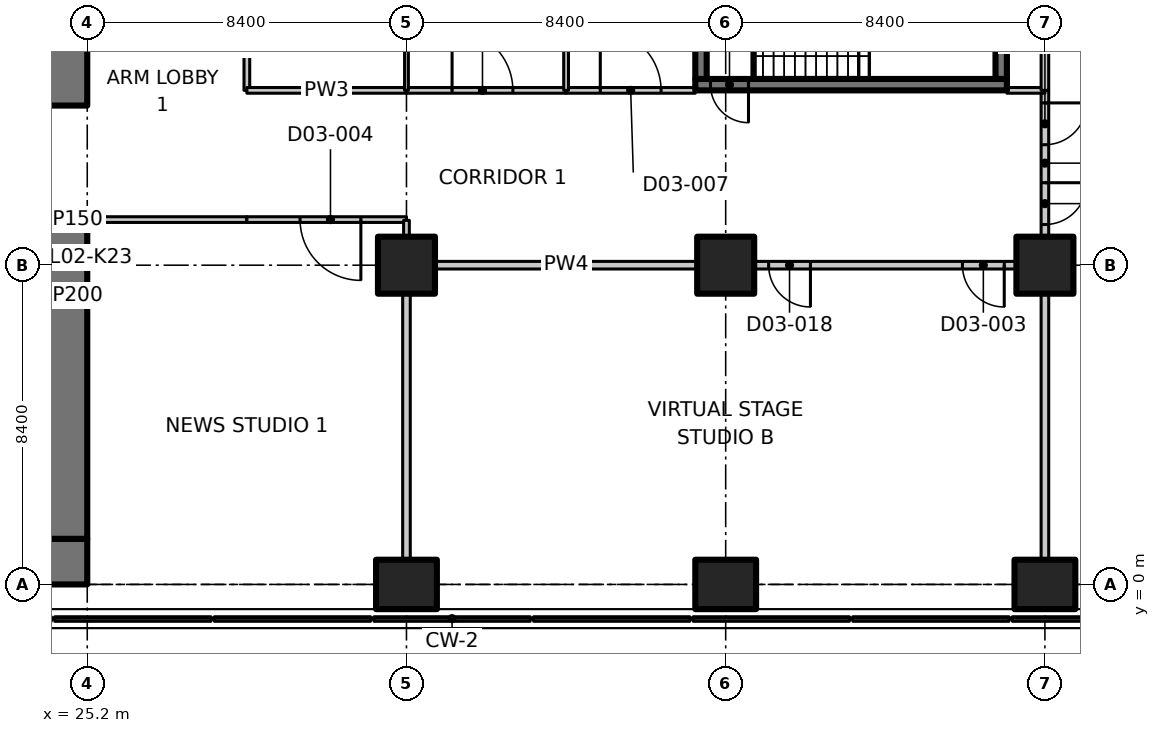
"""IFC4 building model, lengths in metres.
Left out: names, types, materials, properties, quantities, classifications, styles, units other than length and angle.
Written with IfcOpenShell. Run it as: python <this file> out.ifc"""

import sys

from ifc_helpers import new_model, si_unit, direction, frame, frame_2d, origin, origin_2d, place, context, subcontext, project, spatial, polyline, rectangle, outline, extrude, element, fill, save


model = new_model("IFC4")
c1 = context("Model", 3, precision=1e-05, world=origin(), true_north=direction((0.0, 1.0)))
c2 = subcontext(c1, "Body", "Model", "MODEL_VIEW")
j1 = project(units=[si_unit("LENGTHUNIT", "METRE"), si_unit("PLANEANGLEUNIT", "RADIAN")], contexts=[c1])
p1 = place(None, origin())
s1 = spatial("IfcSite", under=j1, at=p1, CompositionType="ELEMENT")
p2 = place(p1, origin())
s2 = spatial("IfcBuilding", under=s1, at=p2, CompositionType="ELEMENT")
p3 = place(p2, frame((0.0, 0.0, 12.5)))
s3 = spatial("IfcBuildingStorey", under=s2, at=p3, CompositionType="ELEMENT", Elevation=12.5)
p4 = place(p3, frame((33.6, 0.0, 0.0), z_axis=(0.0, 0.0, 1.0), x_axis=(0.0, 1.0, 0.0)))
e1 = element("IfcColumn", 1, at=p4, inside=s3, PredefinedType="COLUMN", context=c2, shape_type="SweptSolid", body=[
    extrude(rectangle(XDim=1.3, YDim=1.6, at=origin_2d()), origin(), (0.0, 0.0, 1.0), 7.25),
])
p5 = place(p3, frame((33.6, 8.4, 0.0), z_axis=(0.0, 0.0, 1.0), x_axis=(1.0, 0.0, 0.0)))
e2 = element("IfcColumn", 2, at=p5, inside=s3, PredefinedType="COLUMN", context=c2, shape_type="SweptSolid", body=[
    extrude(rectangle(XDim=1.5, YDim=1.5, at=origin_2d()), origin(), (0.0, 0.0, 1.0), 7.25),
])
p6 = place(p3, frame((42.0, 0.0, 0.0), z_axis=(0.0, 0.0, 1.0), x_axis=(0.0, 1.0, 0.0)))
e3 = element("IfcColumn", 3, at=p6, inside=s3, PredefinedType="COLUMN", context=c2, shape_type="SweptSolid", body=[
    extrude(rectangle(XDim=1.3, YDim=1.6, at=origin_2d()), origin(), (0.0, 0.0, 1.0), 7.25),
])
p7 = place(p3, frame((42.0, 8.4, 0.0), z_axis=(0.0, 0.0, 1.0), x_axis=(1.0, 0.0, 0.0)))
e4 = element("IfcColumn", 4, at=p7, inside=s3, PredefinedType="COLUMN", context=c2, shape_type="SweptSolid", body=[
    extrude(rectangle(XDim=1.5, YDim=1.5, at=origin_2d()), origin(), (0.0, 0.0, 1.0), 7.25),
])
p8 = place(p3, frame((50.4, 0.0, 0.0), z_axis=(0.0, 0.0, 1.0), x_axis=(0.0, 1.0, 0.0)))
e5 = element("IfcColumn", 5, at=p8, inside=s3, PredefinedType="COLUMN", context=c2, shape_type="SweptSolid", body=[
    extrude(rectangle(XDim=1.3, YDim=1.6, at=origin_2d()), origin(), (0.0, 0.0, 1.0), 7.25),
])
p9 = place(p3, frame((50.4, 8.4, 0.0), z_axis=(0.0, 0.0, 1.0), x_axis=(1.0, 0.0, 0.0)))
e6 = element("IfcColumn", 6, at=p9, inside=s3, PredefinedType="COLUMN", context=c2, shape_type="SweptSolid", body=[
    extrude(rectangle(XDim=1.5, YDim=1.5, at=origin_2d()), origin(), (0.0, 0.0, 1.0), 7.25),
])
p10 = place(p3, origin())
e7 = element("IfcWall", 7, at=p10, inside=s3, PredefinedType="SOLIDWALL", context=c2, shape_type="SweptSolid", body=[
    extrude(outline(polyline([(28.455, -0.97), (28.455, -0.85), (24.345, -0.85), (24.345, -0.97), (28.455, -0.97)])), origin(), (0.0, 0.0, 1.0), 7.5),
])
p11 = place(p3, origin())
e8 = element("IfcWall", 8, at=p11, inside=s3, PredefinedType="SOLIDWALL", context=c2, shape_type="SweptSolid", body=[
    extrude(outline(polyline([(32.655, -0.97), (32.655, -0.85), (28.545, -0.85), (28.545, -0.97), (32.655, -0.97)])), origin(), (0.0, 0.0, 1.0), 7.5),
])
p12 = place(p3, origin())
e9 = element("IfcWall", 9, at=p12, inside=s3, PredefinedType="SOLIDWALL", context=c2, shape_type="SweptSolid", body=[
    extrude(outline(polyline([(36.855, -0.97), (36.855, -0.85), (32.745, -0.85), (32.745, -0.97), (36.855, -0.97)])), origin(), (0.0, 0.0, 1.0), 7.5),
])
p13 = place(p3, origin())
e10 = element("IfcWall", 10, at=p13, inside=s3, PredefinedType="SOLIDWALL", context=c2, shape_type="SweptSolid", body=[
    extrude(outline(polyline([(41.055, -0.97), (41.055, -0.85), (36.945, -0.85), (36.945, -0.97), (41.055, -0.97)])), origin(), (0.0, 0.0, 1.0), 7.5),
])
p14 = place(p3, origin())
e11 = element("IfcWall", 11, at=p14, inside=s3, PredefinedType="SOLIDWALL", context=c2, shape_type="SweptSolid", body=[
    extrude(outline(polyline([(45.255, -0.97), (45.255, -0.85), (41.145, -0.85), (41.145, -0.97), (45.255, -0.97)])), origin(), (0.0, 0.0, 1.0), 7.5),
])
p15 = place(p3, origin())
e12 = element("IfcWall", 12, at=p15, inside=s3, PredefinedType="SOLIDWALL", context=c2, shape_type="SweptSolid", body=[
    extrude(outline(polyline([(49.455, -0.97), (49.455, -0.85), (45.345, -0.85), (45.345, -0.97), (49.455, -0.97)])), origin(), (0.0, 0.0, 1.0), 7.5),
])
p16 = place(p3, origin())
e13 = element("IfcWall", 13, at=p16, inside=s3, PredefinedType="SOLIDWALL", context=c2, shape_type="SweptSolid", body=[
    extrude(outline(polyline([(53.655, -0.97), (53.655, -0.85), (49.545, -0.85), (49.545, -0.97), (53.655, -0.97)])), origin(), (0.0, 0.0, 1.0), 7.5),
])
p17 = place(p3, frame((6.736, 0.6, 0.0), z_axis=(0.0, 0.0, 1.0), x_axis=(1.0, 0.0, 0.0)))
e14 = element("IfcWall", 14, at=p17, inside=s3, PredefinedType="SHEAR", context=c2, shape_type="SweptSolid", body=[
    extrude(rectangle(XDim=18.464, YDim=1.2, at=frame_2d((9.232, 0.0))), origin(), (0.0, 0.0, 1.0), 7.25),
])
p18 = place(p3, frame((24.6, 1.2, 0.0), z_axis=(0.0, 0.0, 1.0), x_axis=(0.0, 1.0, 0.0)))
e15 = element("IfcWall", 15, at=p18, inside=s3, PredefinedType="SHEAR", context=c2, shape_type="SweptSolid", body=[
    extrude(rectangle(XDim=8.6, YDim=1.2, at=frame_2d((4.3, 0.0))), origin(), (0.0, 0.0, 1.0), 7.25),
])
p19 = place(p3, frame((24.6, 12.6, 0.0), z_axis=(0.0, 0.0, 1.0), x_axis=(0.0, 1.0, 0.0)))
e16 = element("IfcWall", 16, at=p19, inside=s3, PredefinedType="SHEAR", context=c2, shape_type="SweptSolid", body=[
    extrude(rectangle(XDim=3.0, YDim=1.2, at=frame_2d((1.5, 0.0))), origin(), (0.0, 0.0, 1.0), 7.25),
])
p20 = place(p3, frame((49.4, 13.15, 0.0), z_axis=(0.0, 0.0, 1.0), x_axis=(-1.0, 0.0, 0.0)))
e17 = element("IfcWall", 17, at=p20, inside=s3, PredefinedType="SHEAR", context=c2, shape_type="SweptSolid", body=[
    extrude(rectangle(XDim=8.2, YDim=0.3, at=frame_2d((4.1, 0.0))), origin(), (0.0, 0.0, 1.0), 7.25),
])
p21 = place(p20, frame((6.8, 0.0, 0.0)))
e18 = element("IfcOpeningElement", 18, at=p21, cuts=e17, PredefinedType="OPENING", context=c2, shape_type="SweptSolid", body=[
    extrude(rectangle(XDim=1.0, YDim=2.1, at=frame_2d((0.5, 1.05))), frame((0.0, 0.16, 0.0), z_axis=(0.0, -1.0, 0.0), x_axis=(1.0, 0.0, 0.0)), (0.0, 0.0, 1.0), 0.32),
])
for number, where, z_axis, x_axis in (
    (19, (41.35, 13.3, 0.0), (0.0, 0.0, 1.0), (0.0, 1.0, 0.0)),
    (20, (49.25, 13.3, 0.0), (0.0, 0.0, 1.0), (0.0, 1.0, 0.0)),
):
    element("IfcWall", number, at=place(p3, frame(where, z_axis=z_axis, x_axis=x_axis)), inside=s3, PredefinedType="SHEAR", context=c2, shape_type="SweptSolid", body=[
        extrude(rectangle(XDim=2.55, YDim=0.3, at=frame_2d((1.275, 0.0))), origin(), (0.0, 0.0, 1.0), 7.25),
    ])
p22 = place(p3, frame((29.4, 9.6, 0.0), z_axis=(0.0, 0.0, 1.0), x_axis=(-1.0, 0.0, 0.0)))
e21 = element("IfcWall", 21, at=p22, inside=s3, PredefinedType="PARTITIONING", context=c2, shape_type="SweptSolid", body=[
    extrude(rectangle(XDim=4.2, YDim=0.15, at=frame_2d((2.1, 0.0))), origin(), (0.0, 0.0, 1.0), 7.23),
])
p23 = place(p3, frame((29.4, 21.2, 0.0), z_axis=(0.0, 0.0, 1.0), x_axis=(0.0, -1.0, 0.0)))
e22 = element("IfcWall", 22, at=p23, inside=s3, PredefinedType="PARTITIONING", context=c2, shape_type="SweptSolid", body=[
    extrude(rectangle(XDim=8.2, YDim=0.15, at=frame_2d((4.1, 0.0))), origin(), (0.0, 0.0, 1.0), 7.23),
])
p24 = place(p23, frame((3.3, 0.0, 0.0)))
e23 = element("IfcOpeningElement", 23, at=p24, cuts=e22, PredefinedType="OPENING", context=c2, shape_type="SweptSolid", body=[
    extrude(rectangle(XDim=1.6, YDim=2.1, at=frame_2d((0.8, 1.05))), frame((0.0, 0.085, 0.0), z_axis=(0.0, -1.0, 0.0), x_axis=(1.0, 0.0, 0.0)), (0.0, 0.0, 1.0), 0.17),
])
p25 = place(p3, frame((50.4, 13.0, 0.0), z_axis=(0.0, 0.0, 1.0), x_axis=(0.0, -1.0, 0.0)))
e24 = element("IfcWall", 24, at=p25, inside=s3, PredefinedType="PARTITIONING", context=c2, shape_type="SweptSolid", body=[
    extrude(rectangle(XDim=3.83, YDim=0.2, at=frame_2d((1.915, 0.0))), origin(), (0.0, 0.0, 1.0), 7.23),
])
p26 = place(p25, frame((2.43, 0.0, 0.0)))
e25 = element("IfcOpeningElement", 25, at=p26, cuts=e24, PredefinedType="OPENING", context=c2, shape_type="SweptSolid", body=[
    extrude(rectangle(XDim=1.1, YDim=2.1, at=frame_2d((0.55, 1.05))), frame((0.0, 0.11, 0.0), z_axis=(0.0, -1.0, 0.0), x_axis=(1.0, 0.0, 0.0)), (0.0, 0.0, 1.0), 0.22),
])
p27 = place(p25, frame((0.33, 0.0, 0.0)))
e26 = element("IfcOpeningElement", 26, at=p27, cuts=e24, PredefinedType="OPENING", context=c2, shape_type="SweptSolid", body=[
    extrude(rectangle(XDim=1.1, YDim=2.1, at=frame_2d((0.55, 1.05))), frame((0.0, 0.11, 0.0), z_axis=(0.0, -1.0, 0.0), x_axis=(1.0, 0.0, 0.0)), (0.0, 0.0, 1.0), 0.22),
])
p28 = place(p3, frame((49.63, 8.4, 0.0), z_axis=(0.0, 0.0, 1.0), x_axis=(-1.0, 0.0, 0.0)))
e27 = element("IfcWall", 27, at=p28, inside=s3, PredefinedType="PARTITIONING", context=c2, shape_type="SweptSolid", body=[
    extrude(rectangle(XDim=6.86, YDim=0.2, at=frame_2d((3.43, 0.0))), origin(), (0.0, 0.0, 1.0), 7.23),
])
p29 = place(p28, frame((0.3, 0.0, 0.0)))
e28 = element("IfcOpeningElement", 28, at=p29, cuts=e27, PredefinedType="OPENING", context=c2, shape_type="SweptSolid", body=[
    extrude(rectangle(XDim=1.1, YDim=2.1, at=frame_2d((0.55, 1.05))), frame((0.0, 0.11, 0.0), z_axis=(0.0, -1.0, 0.0), x_axis=(1.0, 0.0, 0.0)), (0.0, 0.0, 1.0), 0.22),
])
p30 = place(p28, frame((5.4, 0.0, 0.0)))
e29 = element("IfcOpeningElement", 29, at=p30, cuts=e27, PredefinedType="OPENING", context=c2, shape_type="SweptSolid", body=[
    extrude(rectangle(XDim=1.1, YDim=2.1, at=frame_2d((0.55, 1.05))), frame((0.0, 0.11, 0.0), z_axis=(0.0, -1.0, 0.0), x_axis=(1.0, 0.0, 0.0)), (0.0, 0.0, 1.0), 0.22),
])
p31 = place(p3, frame((41.23, 8.4, 0.0), z_axis=(0.0, 0.0, 1.0), x_axis=(-1.0, 0.0, 0.0)))
e30 = element("IfcWall", 30, at=p31, inside=s3, PredefinedType="PARTITIONING", context=c2, shape_type="SweptSolid", body=[
    extrude(rectangle(XDim=6.86, YDim=0.2, at=frame_2d((3.43, 0.0))), origin(), (0.0, 0.0, 1.0), 7.23),
])
p32 = place(p3, frame((33.6, 9.6, 0.0), z_axis=(0.0, 0.0, 1.0), x_axis=(-1.0, 0.0, 0.0)))
e31 = element("IfcWall", 31, at=p32, inside=s3, PredefinedType="PARTITIONING", context=c2, shape_type="SweptSolid", body=[
    extrude(rectangle(XDim=4.2, YDim=0.15, at=frame_2d((2.1, 0.0))), origin(), (0.0, 0.0, 1.0), 7.23),
])
p33 = place(p32, frame((1.2, 0.0, 0.0)))
e32 = element("IfcOpeningElement", 32, at=p33, cuts=e31, PredefinedType="OPENING", context=c2, shape_type="SweptSolid", body=[
    extrude(rectangle(XDim=1.6, YDim=2.1, at=frame_2d((0.8, 1.05))), frame((0.0, 0.085, 0.0), z_axis=(0.0, -1.0, 0.0), x_axis=(1.0, 0.0, 0.0)), (0.0, 0.0, 1.0), 0.17),
])
p34 = place(p3, frame((33.6, 9.17, 0.0), z_axis=(0.0, 0.0, 1.0), x_axis=(0.0, 1.0, 0.0)))
e33 = element("IfcWall", 33, at=p34, inside=s3, PredefinedType="PARTITIONING", context=c2, shape_type="SweptSolid", body=[
    extrude(rectangle(XDim=0.41, YDim=0.15, at=frame_2d((0.205, 0.0))), origin(), (0.0, 0.0, 1.0), 7.23),
])
p35 = place(p3, frame((29.4, 13.0, 0.0), z_axis=(0.0, 0.0, 1.0), x_axis=(1.0, 0.0, 0.0)))
e34 = element("IfcWall", 34, at=p35, inside=s3, PredefinedType="PARTITIONING", context=c2, shape_type="SweptSolid", body=[
    extrude(rectangle(XDim=4.2, YDim=0.15, at=frame_2d((2.1, 0.0))), origin(), (0.0, 0.0, 1.0), 7.23),
])
p36 = place(p3, frame((33.6, 13.0, 0.0), z_axis=(0.0, 0.0, 1.0), x_axis=(1.0, 0.0, 0.0)))
e35 = element("IfcWall", 35, at=p36, inside=s3, PredefinedType="PARTITIONING", context=c2, shape_type="SweptSolid", body=[
    extrude(rectangle(XDim=4.2, YDim=0.15, at=frame_2d((2.1, 0.0))), origin(), (0.0, 0.0, 1.0), 7.23),
])
p37 = place(p36, frame((1.2, 0.0, 0.0)))
e36 = element("IfcOpeningElement", 36, at=p37, cuts=e35, PredefinedType="OPENING", context=c2, shape_type="SweptSolid", body=[
    extrude(rectangle(XDim=1.6, YDim=2.1, at=frame_2d((0.8, 1.05))), frame((0.0, 0.085, 0.0), z_axis=(0.0, -1.0, 0.0), x_axis=(1.0, 0.0, 0.0)), (0.0, 0.0, 1.0), 0.17),
])
p38 = place(p3, frame((37.8, 13.0, 0.0), z_axis=(0.0, 0.0, 1.0), x_axis=(1.0, 0.0, 0.0)))
e37 = element("IfcWall", 37, at=p38, inside=s3, PredefinedType="PARTITIONING", context=c2, shape_type="SweptSolid", body=[
    extrude(rectangle(XDim=3.4, YDim=0.15, at=frame_2d((1.7, 0.0))), origin(), (0.0, 0.0, 1.0), 7.23),
])
p39 = place(p38, frame((0.9, 0.0, 0.0)))
e38 = element("IfcOpeningElement", 38, at=p39, cuts=e37, PredefinedType="OPENING", context=c2, shape_type="SweptSolid", body=[
    extrude(rectangle(XDim=1.6, YDim=2.1, at=frame_2d((0.8, 1.05))), frame((0.0, 0.085, 0.0), z_axis=(0.0, -1.0, 0.0), x_axis=(1.0, 0.0, 0.0)), (0.0, 0.0, 1.0), 0.17),
])
p40 = place(p3, frame((49.4, 13.0, 0.0), z_axis=(0.0, 0.0, 1.0), x_axis=(1.0, 0.0, 0.0)))
e39 = element("IfcWall", 39, at=p40, inside=s3, PredefinedType="PARTITIONING", context=c2, shape_type="SweptSolid", body=[
    extrude(rectangle(XDim=1.0, YDim=0.15, at=frame_2d((0.5, 0.0))), origin(), (0.0, 0.0, 1.0), 7.23),
])
p41 = place(p3, frame((50.4, 0.67, 0.0), z_axis=(0.0, 0.0, 1.0), x_axis=(0.0, 1.0, 0.0)))
e40 = element("IfcWall", 40, at=p41, inside=s3, PredefinedType="PARTITIONING", context=c2, shape_type="SweptSolid", body=[
    extrude(rectangle(XDim=6.96, YDim=0.2, at=frame_2d((3.48, 0.0))), origin(), (0.0, 0.0, 1.0), 7.23),
])
p42 = place(p3, frame((50.4, 13.0, 0.0), z_axis=(0.0, 0.0, 1.0), x_axis=(0.0, 1.0, 0.0)))
e41 = element("IfcWall", 41, at=p42, inside=s3, PredefinedType="PARTITIONING", context=c2, shape_type="SweptSolid", body=[
    extrude(rectangle(XDim=3.03, YDim=0.2, at=frame_2d((1.515, 0.0))), origin(), (0.0, 0.0, 1.0), 7.23),
])
p43 = place(p3, frame((33.6, 0.67, 0.0), z_axis=(0.0, 0.0, 1.0), x_axis=(0.0, 1.0, 0.0)))
e42 = element("IfcWall", 42, at=p43, inside=s3, PredefinedType="PARTITIONING", context=c2, shape_type="SweptSolid", body=[
    extrude(rectangle(XDim=6.96, YDim=0.2, at=frame_2d((3.48, 0.0))), origin(), (0.0, 0.0, 1.0), 7.23),
])
p44 = place(p3, frame((33.6, 16.03, 0.0), z_axis=(0.0, 0.0, 1.0), x_axis=(0.0, -1.0, 0.0)))
e43 = element("IfcWall", 43, at=p44, inside=s3, PredefinedType="PARTITIONING", context=c2, shape_type="SweptSolid", body=[
    extrude(rectangle(XDim=3.03, YDim=0.1, at=frame_2d((1.515, 0.0))), origin(), (0.0, 0.0, 1.0), 7.23),
])
p45 = place(p3, frame((37.8, 29.844, 0.0), z_axis=(0.0, 0.0, 1.0), x_axis=(0.0, -1.0, 0.0)))
e44 = element("IfcWall", 44, at=p45, inside=s3, PredefinedType="PARTITIONING", context=c2, shape_type="SweptSolid", body=[
    extrude(outline(polyline([(0.0, 0.0), (16.844, 0.0), (16.844, 7.23), (5.094, 7.23), (5.092, 6.88), (4.196, 6.88), (4.194, 7.23), (0.0, 7.23), (0.0, 0.0)])), frame((0.0, 0.062, 0.0), z_axis=(0.0, -1.0, 0.0), x_axis=(1.0, 0.0, 0.0)), (0.0, 0.0, 1.0), 0.125),
])
p46 = place(p21, origin())
e45 = element("IfcDoor", 45, at=p46, inside=s3, OperationType="SINGLE_SWING_RIGHT", PredefinedType="DOOR", context=c2, shape_type="SweptSolid", body=[
    extrude(rectangle(XDim=1.0, YDim=2.1, at=frame_2d((0.5, 1.05))), frame((0.0, 0.025, 0.0), z_axis=(0.0, -1.0, 0.0), x_axis=(1.0, 0.0, 0.0)), (0.0, 0.0, 1.0), 0.05),
])
fill(e18, e45)
p47 = place(p26, origin())
e46 = element("IfcDoor", 46, at=p47, inside=s3, OperationType="SINGLE_SWING_RIGHT", PredefinedType="DOOR", context=c2, shape_type="SweptSolid", body=[
    extrude(rectangle(XDim=1.1, YDim=2.1, at=frame_2d((0.55, 1.05))), frame((0.0, 0.025, 0.0), z_axis=(0.0, -1.0, 0.0), x_axis=(1.0, 0.0, 0.0)), (0.0, 0.0, 1.0), 0.05),
])
fill(e25, e46)
p48 = place(p29, origin())
e47 = element("IfcDoor", 47, at=p48, inside=s3, OperationType="SINGLE_SWING_LEFT", PredefinedType="DOOR", context=c2, shape_type="SweptSolid", body=[
    extrude(rectangle(XDim=1.1, YDim=2.1, at=frame_2d((0.55, 1.05))), frame((0.0, 0.025, 0.0), z_axis=(0.0, -1.0, 0.0), x_axis=(1.0, 0.0, 0.0)), (0.0, 0.0, 1.0), 0.05),
])
fill(e28, e47)
p49 = place(p33, origin())
e48 = element("IfcDoor", 48, at=p49, inside=s3, OperationType="DOUBLE_DOOR_SINGLE_SWING", PredefinedType="DOOR", context=c2, shape_type="SweptSolid", body=[
    extrude(rectangle(XDim=1.6, YDim=2.1, at=frame_2d((0.8, 1.05))), frame((0.0, 0.025, 0.0), z_axis=(0.0, -1.0, 0.0), x_axis=(1.0, 0.0, 0.0)), (0.0, 0.0, 1.0), 0.05),
])
fill(e32, e48)
p50 = place(p37, origin())
e49 = element("IfcDoor", 49, at=p50, inside=s3, OperationType="DOUBLE_DOOR_SINGLE_SWING", PredefinedType="DOOR", context=c2, shape_type="SweptSolid", body=[
    extrude(rectangle(XDim=1.6, YDim=2.1, at=frame_2d((0.8, 1.05))), frame((0.0, 0.025, 0.0), z_axis=(0.0, -1.0, 0.0), x_axis=(1.0, 0.0, 0.0)), (0.0, 0.0, 1.0), 0.05),
])
fill(e36, e49)
p51 = place(p39, origin())
e50 = element("IfcDoor", 50, at=p51, inside=s3, OperationType="DOUBLE_DOOR_SINGLE_SWING", PredefinedType="DOOR", context=c2, shape_type="SweptSolid", body=[
    extrude(rectangle(XDim=1.6, YDim=2.1, at=frame_2d((0.8, 1.05))), frame((0.0, 0.025, 0.0), z_axis=(0.0, -1.0, 0.0), x_axis=(1.0, 0.0, 0.0)), (0.0, 0.0, 1.0), 0.05),
])
fill(e38, e50)
p52 = place(p27, origin())
e51 = element("IfcDoor", 51, at=p52, inside=s3, OperationType="SINGLE_SWING_RIGHT", PredefinedType="DOOR", context=c2, shape_type="SweptSolid", body=[
    extrude(rectangle(XDim=1.1, YDim=2.1, at=frame_2d((0.55, 1.05))), frame((0.0, 0.025, 0.0), z_axis=(0.0, -1.0, 0.0), x_axis=(1.0, 0.0, 0.0)), (0.0, 0.0, 1.0), 0.05),
])
fill(e26, e51)
p53 = place(p30, origin())
e52 = element("IfcDoor", 52, at=p53, inside=s3, OperationType="SINGLE_SWING_LEFT", PredefinedType="DOOR", context=c2, shape_type="SweptSolid", body=[
    extrude(rectangle(XDim=1.1, YDim=2.1, at=frame_2d((0.55, 1.05))), frame((0.0, 0.025, 0.0), z_axis=(0.0, -1.0, 0.0), x_axis=(1.0, 0.0, 0.0)), (0.0, 0.0, 1.0), 0.05),
])
fill(e29, e52)
save(model, sys.argv[1])
